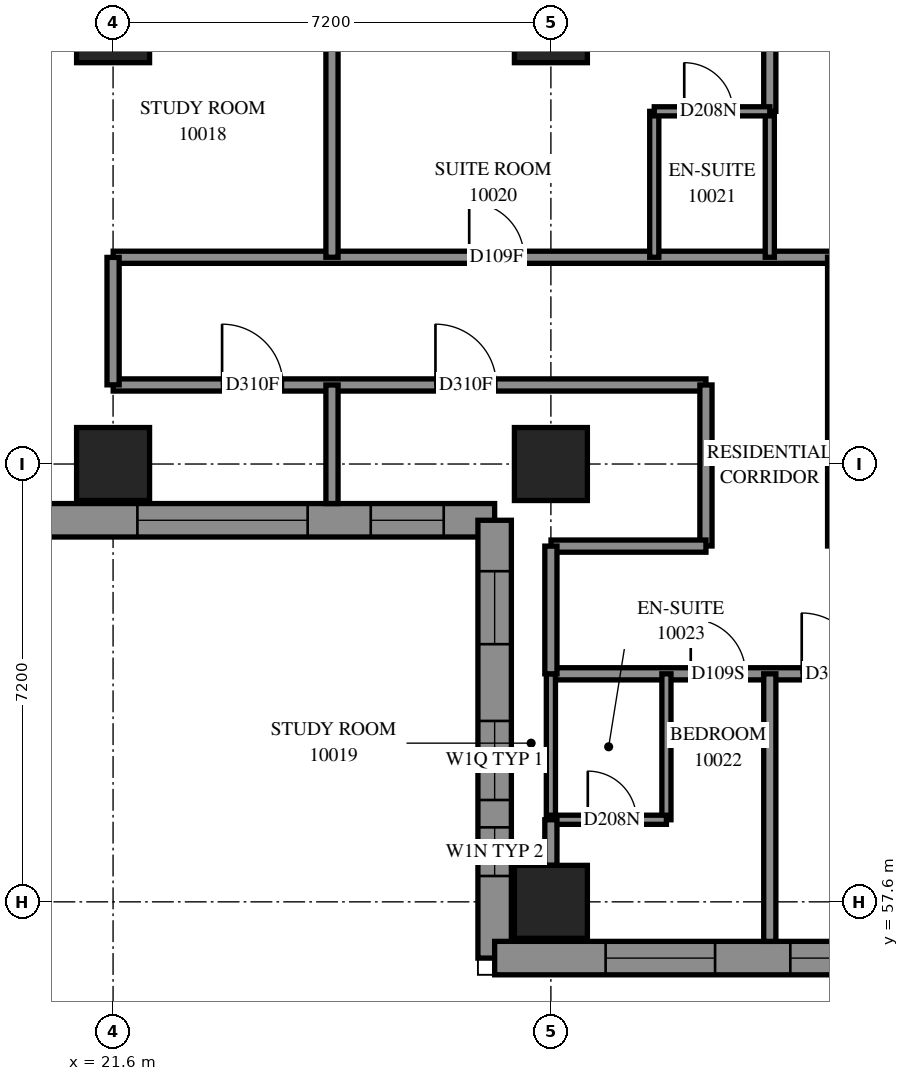
"""IFC4 building model, lengths in metres.
Left out: names, types, materials, properties, quantities, classifications, styles, units other than length and angle.
Written with IfcOpenShell. Run it as: python <this file> out.ifc"""

import sys

from ifc_helpers import new_model, si_unit, direction, frame, frame_2d, origin, origin_2d, place, context, subcontext, project, spatial, polyline, rectangle, outline, extrude, element, fill, save


model = new_model("IFC4")
c1 = context("Model", 3, precision=1e-05, world=origin(), true_north=direction((0.0, 1.0)))
c2 = subcontext(c1, "Body", "Model", "MODEL_VIEW")
j1 = project(units=[si_unit("LENGTHUNIT", "METRE"), si_unit("PLANEANGLEUNIT", "RADIAN")], contexts=[c1])
p1 = place(None, origin())
s1 = spatial("IfcSite", under=j1, at=p1, CompositionType="ELEMENT")
p2 = place(p1, origin())
s2 = spatial("IfcBuilding", under=s1, at=p2, CompositionType="ELEMENT")
p3 = place(p2, frame((0.0, 0.0, 40.6)))
s3 = spatial("IfcBuildingStorey", under=s2, at=p3, CompositionType="ELEMENT", Elevation=40.6)
for number, where, z_axis, x_axis in (
    (1, (21.6, 64.8, 0.0), (0.0, 0.0, 1.0), (1.0, 0.0, 0.0)),
    (2, (21.6, 72.0, 0.0), (0.0, 0.0, 1.0), (1.0, 0.0, 0.0)),
    (3, (28.8, 57.6, 0.0), (0.0, 0.0, 1.0), (1.0, 0.0, 0.0)),
    (4, (28.8, 64.8, 0.0), (0.0, 0.0, 1.0), (1.0, 0.0, 0.0)),
    (5, (28.8, 72.0, 0.0), (0.0, 0.0, 1.0), (1.0, 0.0, 0.0)),
):
    element("IfcColumn", number, at=place(p3, frame(where, z_axis=z_axis, x_axis=x_axis)), inside=s3, PredefinedType="COLUMN", context=c2, shape_type="SweptSolid", body=[
        extrude(rectangle(XDim=1.2, YDim=1.2, at=origin_2d()), origin(), (0.0, 0.0, 1.0), 3.1),
    ])
p4 = place(p3, frame((19.654, 63.875, 0.0), z_axis=(0.0, 0.0, 1.0), x_axis=(1.0, 0.0, 0.0)))
e6 = element("IfcWall", 6, at=p4, inside=s3, PredefinedType="SOLIDWALL", context=c2, shape_type="SweptSolid", body=[
    extrude(outline(polyline([(-0.275, -0.275), (7.946, -0.275), (8.496, 0.275), (0.275, 0.275), (-0.275, -0.275)])), origin(), (0.0, 0.0, 1.0), 3.1),
])
p5 = place(p4, frame((2.346, 0.0, 0.5)))
e7 = element("IfcOpeningElement", 7, at=p5, cuts=e6, PredefinedType="OPENING", context=c2, shape_type="SweptSolid", body=[
    extrude(rectangle(XDim=2.8, YDim=2.45, at=frame_2d((1.4, 1.225))), frame((0.0, 0.285, 0.0), z_axis=(0.0, -1.0, 0.0), x_axis=(1.0, 0.0, 0.0)), (0.0, 0.0, 1.0), 0.57),
])
p6 = place(p4, frame((6.184, 0.0, 0.5)))
e8 = element("IfcOpeningElement", 8, at=p6, cuts=e6, PredefinedType="OPENING", context=c2, shape_type="SweptSolid", body=[
    extrude(rectangle(XDim=1.2, YDim=2.45, at=frame_2d((0.6, 1.225))), frame((0.0, 0.285, 0.0), z_axis=(0.0, -1.0, 0.0), x_axis=(1.0, 0.0, 0.0)), (0.0, 0.0, 1.0), 0.57),
])
p7 = place(p3, frame((27.875, 63.875, 0.0), z_axis=(0.0, 0.0, 1.0), x_axis=(0.0, -1.0, 0.0)))
e9 = element("IfcWall", 9, at=p7, inside=s3, PredefinedType="SOLIDWALL", context=c2, shape_type="SweptSolid", body=[
    extrude(outline(polyline([(0.275, -0.275), (7.475, -0.275), (6.925, 0.275), (-0.275, 0.275), (0.275, -0.275)])), origin(), (0.0, 0.0, 1.0), 3.1),
])
p8 = place(p7, frame((0.838, 0.0, 0.5)))
e10 = element("IfcOpeningElement", 10, at=p8, cuts=e9, PredefinedType="OPENING", context=c2, shape_type="SweptSolid", body=[
    extrude(rectangle(XDim=1.2, YDim=2.45, at=frame_2d((0.6, 1.225))), frame((0.0, 0.285, 0.0), z_axis=(0.0, -1.0, 0.0), x_axis=(1.0, 0.0, 0.0)), (0.0, 0.0, 1.0), 0.57),
])
p9 = place(p7, frame((3.3, 0.0, 0.45)))
e11 = element("IfcOpeningElement", 11, at=p9, cuts=e9, PredefinedType="OPENING", context=c2, shape_type="SweptSolid", body=[
    extrude(rectangle(XDim=1.3, YDim=2.5, at=frame_2d((0.65, 1.25))), frame((0.0, 0.285, 0.0), z_axis=(0.0, -1.0, 0.0), x_axis=(1.0, 0.0, 0.0)), (0.0, 0.0, 1.0), 0.57),
])
p10 = place(p7, frame((5.05, 0.0, 0.45)))
e12 = element("IfcOpeningElement", 12, at=p10, cuts=e9, PredefinedType="OPENING", context=c2, shape_type="SweptSolid", body=[
    extrude(rectangle(XDim=0.8, YDim=2.5, at=frame_2d((0.4, 1.25))), frame((0.0, 0.285, 0.0), z_axis=(0.0, -1.0, 0.0), x_axis=(1.0, 0.0, 0.0)), (0.0, 0.0, 1.0), 0.57),
])
p11 = place(p3, frame((27.875, 56.675, 0.0), z_axis=(0.0, 0.0, 1.0), x_axis=(1.0, 0.0, 0.0)))
e13 = element("IfcWall", 13, at=p11, inside=s3, PredefinedType="SOLIDWALL", context=c2, shape_type="SweptSolid", body=[
    extrude(outline(polyline([(-0.275, -0.275), (6.925, -0.275), (7.475, 0.275), (0.275, 0.275), (-0.275, -0.275)])), origin(), (0.0, 0.0, 1.0), 3.1),
])
p12 = place(p11, frame((1.825, 0.0, 0.6)))
e14 = element("IfcOpeningElement", 14, at=p12, cuts=e13, PredefinedType="OPENING", context=c2, shape_type="SweptSolid", body=[
    extrude(rectangle(XDim=1.8, YDim=1.9, at=frame_2d((0.9, 0.95))), frame((0.0, 0.285, 0.0), z_axis=(0.0, -1.0, 0.0), x_axis=(1.0, 0.0, 0.0)), (0.0, 0.0, 1.0), 0.57),
])
p13 = place(p11, frame((4.862, 0.0, 0.6)))
e15 = element("IfcOpeningElement", 15, at=p13, cuts=e13, PredefinedType="OPENING", context=c2, shape_type="SweptSolid", body=[
    extrude(rectangle(XDim=1.8, YDim=1.9, at=frame_2d((0.9, 0.95))), frame((0.0, 0.285, 0.0), z_axis=(0.0, -1.0, 0.0), x_axis=(1.0, 0.0, 0.0)), (0.0, 0.0, 1.0), 0.57),
])
p14 = place(p3, frame((28.8, 61.35, 0.0), z_axis=(0.0, 0.0, 1.0), x_axis=(1.0, 0.0, 0.0)))
e16 = element("IfcWall", 16, at=p14, inside=s3, PredefinedType="PARTITIONING", context=c2, shape_type="SweptSolid", body=[
    extrude(rectangle(XDim=24.15, YDim=0.2, at=frame_2d((12.075, 0.0))), origin(), (0.0, 0.0, 1.0), 3.1),
])
p15 = place(p14, frame((2.3, 0.0, 0.0)))
e17 = element("IfcOpeningElement", 17, at=p15, cuts=e16, PredefinedType="OPENING", context=c2, shape_type="SweptSolid", body=[
    extrude(rectangle(XDim=0.9, YDim=2.1, at=frame_2d((0.45, 1.05))), frame((0.0, 0.11, 0.0), z_axis=(0.0, -1.0, 0.0), x_axis=(1.0, 0.0, 0.0)), (0.0, 0.0, 1.0), 0.22),
])
p16 = place(p14, frame((4.125, 0.0, 0.0)))
e18 = element("IfcOpeningElement", 18, at=p16, cuts=e16, PredefinedType="OPENING", context=c2, shape_type="SweptSolid", body=[
    extrude(rectangle(XDim=1.0, YDim=2.1, at=frame_2d((0.5, 1.05))), frame((0.0, 0.11, 0.0), z_axis=(0.0, -1.0, 0.0), x_axis=(1.0, 0.0, 0.0)), (0.0, 0.0, 1.0), 0.22),
])
p17 = place(p14, frame((11.061, 0.0, 0.0)))
e19 = element("IfcOpeningElement", 19, at=p17, cuts=e16, PredefinedType="OPENING", context=c2, shape_type="SweptSolid", body=[
    extrude(rectangle(XDim=0.9, YDim=2.1, at=frame_2d((0.45, 1.05))), frame((0.0, 0.11, 0.0), z_axis=(0.0, -1.0, 0.0), x_axis=(1.0, 0.0, 0.0)), (0.0, 0.0, 1.0), 0.22),
])
p18 = place(p14, frame((16.7, 0.0, 0.0)))
e20 = element("IfcOpeningElement", 20, at=p18, cuts=e16, PredefinedType="OPENING", context=c2, shape_type="SweptSolid", body=[
    extrude(rectangle(XDim=0.9, YDim=2.1, at=frame_2d((0.45, 1.05))), frame((0.0, 0.11, 0.0), z_axis=(0.0, -1.0, 0.0), x_axis=(1.0, 0.0, 0.0)), (0.0, 0.0, 1.0), 0.22),
])
p19 = place(p14, frame((18.508, 0.0, 0.0)))
e21 = element("IfcOpeningElement", 21, at=p19, cuts=e16, PredefinedType="OPENING", context=c2, shape_type="SweptSolid", body=[
    extrude(rectangle(XDim=1.0, YDim=2.1, at=frame_2d((0.5, 1.05))), frame((0.0, 0.11, 0.0), z_axis=(0.0, -1.0, 0.0), x_axis=(1.0, 0.0, 0.0)), (0.0, 0.0, 1.0), 0.22),
])
p20 = place(p14, frame((22.882, 0.0, 0.0)))
e22 = element("IfcOpeningElement", 22, at=p20, cuts=e16, PredefinedType="OPENING", context=c2, shape_type="SweptSolid", body=[
    extrude(rectangle(XDim=1.0, YDim=2.1, at=frame_2d((0.5, 1.05))), frame((0.0, 0.11, 0.0), z_axis=(0.0, -1.0, 0.0), x_axis=(1.0, 0.0, 0.0)), (0.0, 0.0, 1.0), 0.22),
])
p21 = place(p3, frame((21.602, 68.2, 0.0), z_axis=(0.0, 0.0, 1.0), x_axis=(1.0, 0.0, 0.0)))
e23 = element("IfcWall", 23, at=p21, inside=s3, PredefinedType="PARTITIONING", context=c2, shape_type="SweptSolid", body=[
    extrude(rectangle(XDim=11.848, YDim=0.2, at=frame_2d((5.924, 0.0))), origin(), (0.0, 0.0, 1.0), 3.1),
])
p22 = place(p21, frame((5.855, 0.0, 0.0)))
e24 = element("IfcOpeningElement", 24, at=p22, cuts=e23, PredefinedType="OPENING", context=c2, shape_type="SweptSolid", body=[
    extrude(rectangle(XDim=0.9, YDim=2.1, at=frame_2d((0.45, 1.05))), frame((0.0, 0.11, 0.0), z_axis=(0.0, -1.0, 0.0), x_axis=(1.0, 0.0, 0.0)), (0.0, 0.0, 1.0), 0.22),
])
p23 = place(p3, frame((21.602, 66.1, 0.0), z_axis=(0.0, 0.0, 1.0), x_axis=(1.0, 0.0, 0.0)))
e25 = element("IfcWall", 25, at=p23, inside=s3, PredefinedType="PARTITIONING", context=c2, shape_type="SweptSolid", body=[
    extrude(rectangle(XDim=9.748, YDim=0.2, at=frame_2d((4.874, 0.0))), origin(), (0.0, 0.0, 1.0), 3.1),
])
p24 = place(p23, frame((1.791, 0.0, 0.0)))
e26 = element("IfcOpeningElement", 26, at=p24, cuts=e25, PredefinedType="OPENING", context=c2, shape_type="SweptSolid", body=[
    extrude(rectangle(XDim=1.0, YDim=2.1, at=frame_2d((0.5, 1.05))), frame((0.0, 0.11, 0.0), z_axis=(0.0, -1.0, 0.0), x_axis=(1.0, 0.0, 0.0)), (0.0, 0.0, 1.0), 0.22),
])
p25 = place(p23, frame((5.3, 0.0, 0.0)))
e27 = element("IfcOpeningElement", 27, at=p25, cuts=e25, PredefinedType="OPENING", context=c2, shape_type="SweptSolid", body=[
    extrude(rectangle(XDim=1.0, YDim=2.1, at=frame_2d((0.5, 1.05))), frame((0.0, 0.11, 0.0), z_axis=(0.0, -1.0, 0.0), x_axis=(1.0, 0.0, 0.0)), (0.0, 0.0, 1.0), 0.22),
])
p26 = place(p3, frame((33.45, 63.452, 0.0), z_axis=(0.0, 0.0, 1.0), x_axis=(0.0, 1.0, 0.0)))
e28 = element("IfcWall", 28, at=p26, inside=s3, PredefinedType="PARTITIONING", context=c2, shape_type="SweptSolid", body=[
    extrude(rectangle(XDim=4.748, YDim=0.2, at=frame_2d((2.374, 0.0))), origin(), (0.0, 0.0, 1.0), 3.1),
])
p27 = place(p3, frame((25.2, 68.2, 0.0), z_axis=(0.0, 0.0, 1.0), x_axis=(0.0, 1.0, 0.0)))
e29 = element("IfcWall", 29, at=p27, inside=s3, PredefinedType="PARTITIONING", context=c2, shape_type="SweptSolid", body=[
    extrude(rectangle(XDim=4.671, YDim=0.2, at=frame_2d((2.336, 0.0))), origin(), (0.0, 0.0, 1.0), 3.1),
])
p28 = place(p3, frame((32.4, 56.95, 0.0), z_axis=(0.0, 0.0, 1.0), x_axis=(0.0, 1.0, 0.0)))
e30 = element("IfcWall", 30, at=p28, inside=s3, PredefinedType="PARTITIONING", context=c2, shape_type="SweptSolid", body=[
    extrude(rectangle(XDim=4.4, YDim=0.2, at=frame_2d((2.2, 0.0))), origin(), (0.0, 0.0, 1.0), 3.1),
])
p29 = place(p3, frame((31.35, 63.452, 0.0), z_axis=(0.0, 0.0, 1.0), x_axis=(0.0, 1.0, 0.0)))
e31 = element("IfcWall", 31, at=p29, inside=s3, PredefinedType="PARTITIONING", context=c2, shape_type="SweptSolid", body=[
    extrude(rectangle(XDim=2.648, YDim=0.2, at=frame_2d((1.324, 0.0))), origin(), (0.0, 0.0, 1.0), 3.1),
])
p30 = place(p3, frame((28.802, 63.45, 0.0), z_axis=(0.0, 0.0, 1.0), x_axis=(1.0, 0.0, 0.0)))
e32 = element("IfcWall", 32, at=p30, inside=s3, PredefinedType="PARTITIONING", context=c2, shape_type="SweptSolid", body=[
    extrude(rectangle(XDim=2.548, YDim=0.2, at=frame_2d((1.274, 0.0))), origin(), (0.0, 0.0, 1.0), 3.1),
])
p31 = place(p3, frame((30.7, 58.95, 0.0), z_axis=(0.0, 0.0, 1.0), x_axis=(0.0, 1.0, 0.0)))
e33 = element("IfcWall", 33, at=p31, inside=s3, PredefinedType="PARTITIONING", context=c2, shape_type="SweptSolid", body=[
    extrude(rectangle(XDim=2.4, YDim=0.15, at=frame_2d((1.2, 0.0))), origin(), (0.0, 0.0, 1.0), 3.1),
])
p32 = place(p3, frame((28.8, 58.95, 0.0), z_axis=(0.0, 0.0, 1.0), x_axis=(0.0, 1.0, 0.0)))
e34 = element("IfcWall", 34, at=p32, inside=s3, PredefinedType="PARTITIONING", context=c2, shape_type="SweptSolid", body=[
    extrude(rectangle(XDim=2.4, YDim=0.15, at=frame_2d((1.2, 0.0))), origin(), (0.0, 0.0, 1.0), 2.6),
])
for number, where, z_axis, x_axis in (
    (35, (30.5, 68.2, 0.0), (0.0, 0.0, 1.0), (0.0, 1.0, 0.0)),
    (36, (32.4, 68.2, 0.0), (0.0, 0.0, 1.0), (0.0, 1.0, 0.0)),
):
    element("IfcWall", number, at=place(p3, frame(where, z_axis=z_axis, x_axis=x_axis)), inside=s3, PredefinedType="PARTITIONING", context=c2, shape_type="SweptSolid", body=[
        extrude(rectangle(XDim=2.4, YDim=0.15, at=frame_2d((1.2, 0.0))), origin(), (0.0, 0.0, 1.0), 3.1),
    ])
p33 = place(p3, frame((32.4, 70.6, 0.0), z_axis=(0.0, 0.0, 1.0), x_axis=(0.0, 1.0, 0.0)))
e37 = element("IfcWall", 37, at=p33, inside=s3, PredefinedType="PARTITIONING", context=c2, shape_type="SweptSolid", body=[
    extrude(rectangle(XDim=2.228, YDim=0.2, at=frame_2d((1.114, 0.0))), origin(), (0.0, 0.0, 1.0), 3.1),
])
p34 = place(p3, frame((28.8, 61.35, 0.0), z_axis=(0.0, 0.0, 1.0), x_axis=(0.0, 1.0, 0.0)))
e38 = element("IfcWall", 38, at=p34, inside=s3, PredefinedType="PARTITIONING", context=c2, shape_type="SweptSolid", body=[
    extrude(rectangle(XDim=2.1, YDim=0.2, at=frame_2d((1.05, 0.0))), origin(), (0.0, 0.0, 1.0), 2.6),
])
p35 = place(p3, frame((21.6, 66.102, 0.0), z_axis=(0.0, 0.0, 1.0), x_axis=(0.0, 1.0, 0.0)))
e39 = element("IfcWall", 39, at=p35, inside=s3, PredefinedType="PARTITIONING", context=c2, shape_type="SweptSolid", body=[
    extrude(rectangle(XDim=2.096, YDim=0.2, at=frame_2d((1.048, 0.0))), origin(), (0.0, 0.0, 1.0), 2.6),
])
p36 = place(p3, frame((28.8, 58.95, 0.0), z_axis=(0.0, 0.0, 1.0), x_axis=(1.0, 0.0, 0.0)))
e40 = element("IfcWall", 40, at=p36, inside=s3, PredefinedType="PARTITIONING", context=c2, shape_type="SweptSolid", body=[
    extrude(rectangle(XDim=1.9, YDim=0.15, at=frame_2d((0.95, 0.0))), origin(), (0.0, 0.0, 1.0), 3.1),
])
p37 = place(p36, frame((0.607, 0.0, 0.0)))
e41 = element("IfcOpeningElement", 41, at=p37, cuts=e40, PredefinedType="OPENING", context=c2, shape_type="SweptSolid", body=[
    extrude(rectangle(XDim=0.8, YDim=2.1, at=frame_2d((0.4, 1.05))), frame((0.0, 0.085, 0.0), z_axis=(0.0, -1.0, 0.0), x_axis=(1.0, 0.0, 0.0)), (0.0, 0.0, 1.0), 0.17),
])
p38 = place(p3, frame((30.5, 70.6, 0.0), z_axis=(0.0, 0.0, 1.0), x_axis=(1.0, 0.0, 0.0)))
e42 = element("IfcWall", 42, at=p38, inside=s3, PredefinedType="PARTITIONING", context=c2, shape_type="SweptSolid", body=[
    extrude(rectangle(XDim=1.9, YDim=0.15, at=frame_2d((0.95, 0.0))), origin(), (0.0, 0.0, 1.0), 3.1),
])
p39 = place(p38, frame((0.493, 0.0, 0.0)))
e43 = element("IfcOpeningElement", 43, at=p39, cuts=e42, PredefinedType="OPENING", context=c2, shape_type="SweptSolid", body=[
    extrude(rectangle(XDim=0.8, YDim=2.1, at=frame_2d((0.4, 1.05))), frame((0.0, 0.085, 0.0), z_axis=(0.0, -1.0, 0.0), x_axis=(1.0, 0.0, 0.0)), (0.0, 0.0, 1.0), 0.17),
])
p40 = place(p3, frame((25.2, 64.15, 0.0), z_axis=(0.0, 0.0, 1.0), x_axis=(0.0, 1.0, 0.0)))
e44 = element("IfcWall", 44, at=p40, inside=s3, PredefinedType="PARTITIONING", context=c2, shape_type="SweptSolid", body=[
    extrude(rectangle(XDim=1.95, YDim=0.2, at=frame_2d((0.975, 0.0))), origin(), (0.0, 0.0, 1.0), 3.1),
])
p41 = place(p3, frame((28.8, 58.2, 0.0), z_axis=(0.0, 0.0, 1.0), x_axis=(0.0, 1.0, 0.0)))
e45 = element("IfcWall", 45, at=p41, inside=s3, PredefinedType="PARTITIONING", context=c2, shape_type="SweptSolid", body=[
    extrude(rectangle(XDim=0.75, YDim=0.2, at=frame_2d((0.375, 0.0))), origin(), (0.0, 0.0, 1.0), 2.6),
])
p42 = place(p5, origin())
e46 = element("IfcWindow", 46, at=p42, inside=s3, PartitioningType="SINGLE_PANEL", PredefinedType="WINDOW", context=c2, shape_type="SweptSolid", body=[
    extrude(rectangle(XDim=2.8, YDim=2.45, at=frame_2d((1.4, 1.225))), frame((0.0, 0.155, 0.0), z_axis=(0.0, -1.0, 0.0), x_axis=(1.0, 0.0, 0.0)), (0.0, 0.0, 1.0), 0.06),
])
fill(e7, e46)
p43 = place(p6, origin())
e47 = element("IfcWindow", 47, at=p43, inside=s3, PartitioningType="SINGLE_PANEL", PredefinedType="WINDOW", context=c2, shape_type="SweptSolid", body=[
    extrude(rectangle(XDim=1.2, YDim=2.45, at=frame_2d((0.6, 1.225))), frame((0.0, 0.155, 0.0), z_axis=(0.0, -1.0, 0.0), x_axis=(1.0, 0.0, 0.0)), (0.0, 0.0, 1.0), 0.06),
])
fill(e8, e47)
p44 = place(p8, origin())
e48 = element("IfcWindow", 48, at=p44, inside=s3, PartitioningType="SINGLE_PANEL", PredefinedType="WINDOW", context=c2, shape_type="SweptSolid", body=[
    extrude(rectangle(XDim=1.2, YDim=2.45, at=frame_2d((0.6, 1.225))), frame((0.0, 0.155, 0.0), z_axis=(0.0, -1.0, 0.0), x_axis=(1.0, 0.0, 0.0)), (0.0, 0.0, 1.0), 0.06),
])
fill(e10, e48)
p45 = place(p12, origin())
e49 = element("IfcWindow", 49, at=p45, inside=s3, PartitioningType="SINGLE_PANEL", PredefinedType="WINDOW", context=c2, shape_type="SweptSolid", body=[
    extrude(rectangle(XDim=1.8, YDim=1.9, at=frame_2d((0.9, 0.95))), frame((0.0, 0.155, 0.0), z_axis=(0.0, -1.0, 0.0), x_axis=(1.0, 0.0, 0.0)), (0.0, 0.0, 1.0), 0.06),
])
fill(e14, e49)
p46 = place(p13, origin())
e50 = element("IfcWindow", 50, at=p46, inside=s3, PartitioningType="SINGLE_PANEL", PredefinedType="WINDOW", context=c2, shape_type="SweptSolid", body=[
    extrude(rectangle(XDim=1.8, YDim=1.9, at=frame_2d((0.9, 0.95))), frame((0.0, 0.155, 0.0), z_axis=(0.0, -1.0, 0.0), x_axis=(1.0, 0.0, 0.0)), (0.0, 0.0, 1.0), 0.06),
])
fill(e15, e50)
p47 = place(p24, origin())
e51 = element("IfcDoor", 51, at=p47, inside=s3, OperationType="SINGLE_SWING_RIGHT", PredefinedType="DOOR", context=c2, shape_type="SweptSolid", body=[
    extrude(rectangle(XDim=1.0, YDim=2.1, at=frame_2d((0.5, 1.05))), frame((0.0, 0.025, 0.0), z_axis=(0.0, -1.0, 0.0), x_axis=(1.0, 0.0, 0.0)), (0.0, 0.0, 1.0), 0.05),
])
fill(e26, e51)
p48 = place(p25, origin())
e52 = element("IfcDoor", 52, at=p48, inside=s3, OperationType="SINGLE_SWING_RIGHT", PredefinedType="DOOR", context=c2, shape_type="SweptSolid", body=[
    extrude(rectangle(XDim=1.0, YDim=2.1, at=frame_2d((0.5, 1.05))), frame((0.0, 0.025, 0.0), z_axis=(0.0, -1.0, 0.0), x_axis=(1.0, 0.0, 0.0)), (0.0, 0.0, 1.0), 0.05),
])
fill(e27, e52)
p49 = place(p22, origin())
e53 = element("IfcDoor", 53, at=p49, inside=s3, OperationType="SINGLE_SWING_LEFT", PredefinedType="DOOR", context=c2, shape_type="SweptSolid", body=[
    extrude(rectangle(XDim=0.9, YDim=2.1, at=frame_2d((0.45, 1.05))), frame((0.0, 0.025, 0.0), z_axis=(0.0, -1.0, 0.0), x_axis=(1.0, 0.0, 0.0)), (0.0, 0.0, 1.0), 0.05),
])
fill(e24, e53)
p50 = place(p39, origin())
e54 = element("IfcDoor", 54, at=p50, inside=s3, OperationType="SINGLE_SWING_RIGHT", PredefinedType="DOOR", context=c2, shape_type="SweptSolid", body=[
    extrude(rectangle(XDim=0.8, YDim=2.1, at=frame_2d((0.4, 1.05))), frame((0.0, 0.025, 0.0), z_axis=(0.0, -1.0, 0.0), x_axis=(1.0, 0.0, 0.0)), (0.0, 0.0, 1.0), 0.05),
])
fill(e43, e54)
p51 = place(p15, origin())
e55 = element("IfcDoor", 55, at=p51, inside=s3, OperationType="SINGLE_SWING_LEFT", PredefinedType="DOOR", context=c2, shape_type="SweptSolid", body=[
    extrude(rectangle(XDim=0.9, YDim=2.1, at=frame_2d((0.45, 1.05))), frame((0.0, 0.025, 0.0), z_axis=(0.0, -1.0, 0.0), x_axis=(1.0, 0.0, 0.0)), (0.0, 0.0, 1.0), 0.05),
])
fill(e17, e55)
p52 = place(p37, origin())
e56 = element("IfcDoor", 56, at=p52, inside=s3, OperationType="SINGLE_SWING_RIGHT", PredefinedType="DOOR", context=c2, shape_type="SweptSolid", body=[
    extrude(rectangle(XDim=0.8, YDim=2.1, at=frame_2d((0.4, 1.05))), frame((0.0, 0.025, 0.0), z_axis=(0.0, -1.0, 0.0), x_axis=(1.0, 0.0, 0.0)), (0.0, 0.0, 1.0), 0.05),
])
fill(e41, e56)
p53 = place(p16, origin())
e57 = element("IfcDoor", 57, at=p53, inside=s3, OperationType="SINGLE_SWING_RIGHT", PredefinedType="DOOR", context=c2, shape_type="SweptSolid", body=[
    extrude(rectangle(XDim=1.0, YDim=2.1, at=frame_2d((0.5, 1.05))), frame((0.0, 0.025, 0.0), z_axis=(0.0, -1.0, 0.0), x_axis=(1.0, 0.0, 0.0)), (0.0, 0.0, 1.0), 0.05),
])
fill(e18, e57)
p54 = place(p9, origin())
e58 = element("IfcWindow", 58, at=p54, inside=s3, PartitioningType="SINGLE_PANEL", PredefinedType="WINDOW", context=c2, shape_type="SweptSolid", body=[
    extrude(rectangle(XDim=1.3, YDim=2.5, at=frame_2d((0.65, 1.25))), frame((0.0, 0.155, 0.0), z_axis=(0.0, -1.0, 0.0), x_axis=(1.0, 0.0, 0.0)), (0.0, 0.0, 1.0), 0.06),
])
fill(e11, e58)
p55 = place(p10, origin())
e59 = element("IfcWindow", 59, at=p55, inside=s3, PartitioningType="SINGLE_PANEL", PredefinedType="WINDOW", context=c2, shape_type="SweptSolid", body=[
    extrude(rectangle(XDim=0.8, YDim=2.5, at=frame_2d((0.4, 1.25))), frame((0.0, 0.155, 0.0), z_axis=(0.0, -1.0, 0.0), x_axis=(1.0, 0.0, 0.0)), (0.0, 0.0, 1.0), 0.06),
])
fill(e12, e59)
save(model, sys.argv[1])
